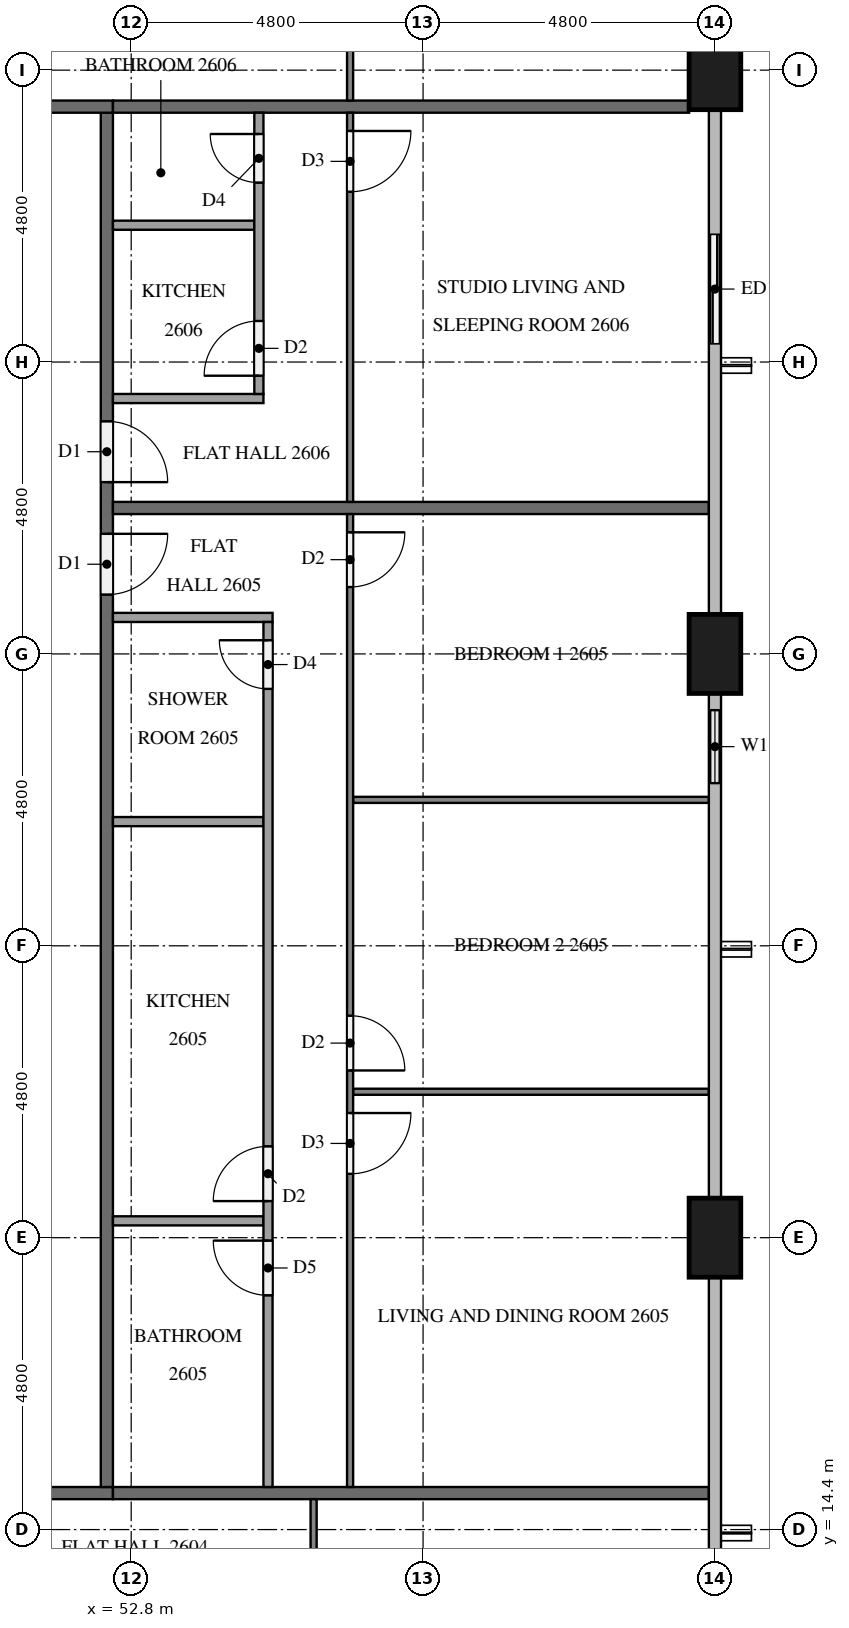
"""IFC4 building model, lengths in metres.
Left out: names, types, materials, properties, quantities, classifications, styles, units other than length and angle.
Written with IfcOpenShell. Run it as: python <this file> out.ifc"""

import sys

from ifc_helpers import new_model, si_unit, direction, frame, frame_2d, origin, origin_2d, place, context, subcontext, project, spatial, rectangle, extrude, element, fill, save


model = new_model("IFC4")
c1 = context("Model", 3, precision=1e-05, world=origin(), true_north=direction((0.0, 1.0)))
c2 = subcontext(c1, "Body", "Model", "MODEL_VIEW")
j1 = project(units=[si_unit("LENGTHUNIT", "METRE"), si_unit("PLANEANGLEUNIT", "RADIAN")], contexts=[c1])
p1 = place(None, origin())
s1 = spatial("IfcSite", under=j1, at=p1, CompositionType="ELEMENT")
p2 = place(p1, origin())
s2 = spatial("IfcBuilding", under=s1, at=p2, CompositionType="ELEMENT")
p3 = place(p2, frame((0.0, 0.0, 103.2)))
s3 = spatial("IfcBuildingStorey", under=s2, at=p3, CompositionType="ELEMENT", Elevation=103.2)
for number, where, z_axis, x_axis in (
    (1, (62.4, 19.2, 0.0), (0.0, 0.0, 1.0), (0.0, 1.0, 0.0)),
    (2, (62.4, 28.8, 0.0), (0.0, 0.0, 1.0), (0.0, 1.0, 0.0)),
    (3, (62.4, 38.4, 0.0), (0.0, 0.0, 1.0), (0.0, 1.0, 0.0)),
):
    element("IfcColumn", number, at=place(p3, frame(where, z_axis=z_axis, x_axis=x_axis)), inside=s3, PredefinedType="COLUMN", context=c2, shape_type="SweptSolid", body=[
        extrude(rectangle(XDim=1.3, YDim=0.85, at=origin_2d()), origin(), (0.0, 0.0, 1.0), 3.2),
    ])
p4 = place(p3, frame((62.4, 26.4, 0.0), z_axis=(0.0, 0.0, 1.0), x_axis=(0.0, 1.0, 0.0)))
e4 = element("IfcWall", 4, at=p4, inside=s3, PredefinedType="SOLIDWALL", context=c2, shape_type="SweptSolid", body=[
    extrude(rectangle(XDim=1.75, YDim=0.15, at=frame_2d((0.875, 0.0))), origin(), (0.0, 0.0, 1.0), 3.2),
])
p5 = place(p4, frame((0.275, 0.0, 0.9)))
e5 = element("IfcOpeningElement", 5, at=p5, cuts=e4, PredefinedType="OPENING", context=c2, shape_type="SweptSolid", body=[
    extrude(rectangle(XDim=1.2, YDim=1.4, at=frame_2d((0.6, 0.7))), frame((0.0, 0.085, 0.0), z_axis=(0.0, -1.0, 0.0), x_axis=(1.0, 0.0, 0.0)), (0.0, 0.0, 1.0), 0.17),
])
p6 = place(p3, frame((62.4, 33.6, 0.0), z_axis=(0.0, 0.0, 1.0), x_axis=(0.0, 1.0, 0.0)))
e6 = element("IfcWall", 6, at=p6, inside=s3, PredefinedType="SOLIDWALL", context=c2, shape_type="SweptSolid", body=[
    extrude(rectangle(XDim=2.4, YDim=0.15, at=frame_2d((1.2, 0.0))), origin(), (0.0, 0.0, 1.0), 3.2),
])
p7 = place(p6, frame((0.3, 0.0, 0.0)))
e7 = element("IfcOpeningElement", 7, at=p7, cuts=e6, PredefinedType="OPENING", context=c2, shape_type="SweptSolid", body=[
    extrude(rectangle(XDim=1.8, YDim=2.4, at=frame_2d((0.9, 1.2))), frame((0.0, 0.085, 0.0), z_axis=(0.0, -1.0, 0.0), x_axis=(1.0, 0.0, 0.0)), (0.0, 0.0, 1.0), 0.17),
])
p8 = place(p3, frame((50.3, 15.0, 0.0), z_axis=(0.0, 0.0, 1.0), x_axis=(1.0, 0.0, 0.0)))
e8 = element("IfcWall", 8, at=p8, inside=s3, PredefinedType="PARTITIONING", context=c2, shape_type="SweptSolid", body=[
    extrude(rectangle(XDim=2.2, YDim=0.2, at=frame_2d((1.1, 0.0))), origin(), (0.0, 0.0, 1.0), 3.2),
])
p9 = place(p3, frame((52.4, 37.7, 0.0), z_axis=(0.0, 0.0, 1.0), x_axis=(0.0, -1.0, 0.0)))
e9 = element("IfcWall", 9, at=p9, inside=s3, PredefinedType="PARTITIONING", context=c2, shape_type="SweptSolid", body=[
    extrude(rectangle(XDim=22.6, YDim=0.2, at=frame_2d((11.3, 0.0))), origin(), (0.0, 0.0, 1.0), 3.2),
])
p10 = place(p9, frame((6.925, 0.0, 0.0)))
e10 = element("IfcOpeningElement", 10, at=p10, cuts=e9, PredefinedType="OPENING", context=c2, shape_type="SweptSolid", body=[
    extrude(rectangle(XDim=1.0, YDim=2.1, at=frame_2d((0.5, 1.05))), frame((0.0, 0.11, 0.0), z_axis=(0.0, -1.0, 0.0), x_axis=(1.0, 0.0, 0.0)), (0.0, 0.0, 1.0), 0.22),
])
p11 = place(p9, frame((5.075, 0.0, 0.0)))
e11 = element("IfcOpeningElement", 11, at=p11, cuts=e9, PredefinedType="OPENING", context=c2, shape_type="SweptSolid", body=[
    extrude(rectangle(XDim=1.0, YDim=2.1, at=frame_2d((0.5, 1.05))), frame((0.0, 0.11, 0.0), z_axis=(0.0, -1.0, 0.0), x_axis=(1.0, 0.0, 0.0)), (0.0, 0.0, 1.0), 0.22),
])
p12 = place(p3, frame((52.5, 37.8, 0.0), z_axis=(0.0, 0.0, 1.0), x_axis=(-1.0, 0.0, 0.0)))
e12 = element("IfcWall", 12, at=p12, inside=s3, PredefinedType="PARTITIONING", context=c2, shape_type="SweptSolid", body=[
    extrude(rectangle(XDim=2.2, YDim=0.2, at=frame_2d((1.1, 0.0))), origin(), (0.0, 0.0, 1.0), 3.2),
])
for number, where, z_axis, x_axis in (
    (13, (52.5, 15.0, 0.0), (0.0, 0.0, 1.0), (1.0, 0.0, 0.0)),
    (14, (52.5, 31.2, 0.0), (0.0, 0.0, 1.0), (1.0, 0.0, 0.0)),
):
    element("IfcWall", number, at=place(p3, frame(where, z_axis=z_axis, x_axis=x_axis)), inside=s3, PredefinedType="PARTITIONING", context=c2, shape_type="SweptSolid", body=[
        extrude(rectangle(XDim=9.8, YDim=0.2, at=frame_2d((4.9, 0.0))), origin(), (0.0, 0.0, 1.0), 3.2),
    ])
p13 = place(p3, frame((52.5, 37.8, 0.0), z_axis=(0.0, 0.0, 1.0), x_axis=(1.0, 0.0, 0.0)))
e15 = element("IfcWall", 15, at=p13, inside=s3, PredefinedType="PARTITIONING", context=c2, shape_type="SweptSolid", body=[
    extrude(rectangle(XDim=9.475, YDim=0.2, at=frame_2d((4.738, 0.0))), origin(), (0.0, 0.0, 1.0), 3.2),
])
p14 = place(p3, frame((55.8, 14.9, 0.0), z_axis=(0.0, 0.0, 1.0), x_axis=(0.0, -1.0, 0.0)))
e16 = element("IfcWall", 16, at=p14, inside=s3, PredefinedType="PARTITIONING", context=c2, shape_type="SweptSolid", body=[
    extrude(rectangle(XDim=10.0, YDim=0.1, at=frame_2d((5.0, 0.0))), origin(), (0.0, 0.0, 1.0), 3.2),
])
p15 = place(p14, frame((4.05, 0.0, 0.0)))
e17 = element("IfcOpeningElement", 17, at=p15, cuts=e16, PredefinedType="OPENING", context=c2, shape_type="SweptSolid", body=[
    extrude(rectangle(XDim=0.9, YDim=2.1, at=frame_2d((0.45, 1.05))), frame((0.0, 0.06, 0.0), z_axis=(0.0, -1.0, 0.0), x_axis=(1.0, 0.0, 0.0)), (0.0, 0.0, 1.0), 0.12),
])
p16 = place(p14, frame((5.65, 0.0, 0.0)))
e18 = element("IfcOpeningElement", 18, at=p16, cuts=e16, PredefinedType="OPENING", context=c2, shape_type="SweptSolid", body=[
    extrude(rectangle(XDim=1.0, YDim=2.1, at=frame_2d((0.5, 1.05))), frame((0.0, 0.06, 0.0), z_axis=(0.0, -1.0, 0.0), x_axis=(1.0, 0.0, 0.0)), (0.0, 0.0, 1.0), 0.12),
])
for number, where, z_axis, x_axis in (
    (19, (56.45, 26.4, 0.0), (0.0, 0.0, 1.0), (1.0, 0.0, 0.0)),
    (20, (56.45, 21.6, 0.0), (0.0, 0.0, 1.0), (1.0, 0.0, 0.0)),
):
    element("IfcWall", number, at=place(p3, frame(where, z_axis=z_axis, x_axis=x_axis)), inside=s3, PredefinedType="PARTITIONING", context=c2, shape_type="SweptSolid", body=[
        extrude(rectangle(XDim=5.85, YDim=0.1, at=frame_2d((2.925, 0.0))), origin(), (0.0, 0.0, 1.0), 3.2),
    ])
p17 = place(p3, frame((56.4, 31.1, 0.0), z_axis=(0.0, 0.0, 1.0), x_axis=(0.0, -1.0, 0.0)))
e21 = element("IfcWall", 21, at=p17, inside=s3, PredefinedType="PARTITIONING", context=c2, shape_type="SweptSolid", body=[
    extrude(rectangle(XDim=16.0, YDim=0.1, at=frame_2d((8.0, 0.0))), origin(), (0.0, 0.0, 1.0), 3.2),
])
p18 = place(p17, frame((0.3, 0.0, 0.0)))
e22 = element("IfcOpeningElement", 22, at=p18, cuts=e21, PredefinedType="OPENING", context=c2, shape_type="SweptSolid", body=[
    extrude(rectangle(XDim=0.9, YDim=2.1, at=frame_2d((0.45, 1.05))), frame((0.0, 0.06, 0.0), z_axis=(0.0, -1.0, 0.0), x_axis=(1.0, 0.0, 0.0)), (0.0, 0.0, 1.0), 0.12),
])
p19 = place(p17, frame((8.25, 0.0, 0.0)))
e23 = element("IfcOpeningElement", 23, at=p19, cuts=e21, PredefinedType="OPENING", context=c2, shape_type="SweptSolid", body=[
    extrude(rectangle(XDim=0.9, YDim=2.1, at=frame_2d((0.45, 1.05))), frame((0.0, 0.06, 0.0), z_axis=(0.0, -1.0, 0.0), x_axis=(1.0, 0.0, 0.0)), (0.0, 0.0, 1.0), 0.12),
])
p20 = place(p17, frame((9.85, 0.0, 0.0)))
e24 = element("IfcOpeningElement", 24, at=p20, cuts=e21, PredefinedType="OPENING", context=c2, shape_type="SweptSolid", body=[
    extrude(rectangle(XDim=1.0, YDim=2.1, at=frame_2d((0.5, 1.05))), frame((0.0, 0.06, 0.0), z_axis=(0.0, -1.0, 0.0), x_axis=(1.0, 0.0, 0.0)), (0.0, 0.0, 1.0), 0.12),
])
for number, where, z_axis, x_axis in (
    (25, (52.5, 26.042, 0.0), (0.0, 0.0, 1.0), (1.0, 0.0, 0.0)),
    (26, (52.5, 19.477, 0.0), (0.0, 0.0, 1.0), (1.0, 0.0, 0.0)),
):
    element("IfcWall", number, at=place(p3, frame(where, z_axis=z_axis, x_axis=x_axis)), inside=s3, PredefinedType="PARTITIONING", context=c2, shape_type="SweptSolid", body=[
        extrude(rectangle(XDim=2.475, YDim=0.15, at=frame_2d((1.238, 0.0))), origin(), (0.0, 0.0, 1.0), 3.2),
    ])
p21 = place(p3, frame((52.5, 29.4, 0.0), z_axis=(0.0, 0.0, 1.0), x_axis=(1.0, 0.0, 0.0)))
e27 = element("IfcWall", 27, at=p21, inside=s3, PredefinedType="PARTITIONING", context=c2, shape_type="SweptSolid", body=[
    extrude(rectangle(XDim=2.625, YDim=0.15, at=frame_2d((1.312, 0.0))), origin(), (0.0, 0.0, 1.0), 3.2),
])
p22 = place(p3, frame((55.05, 15.1, 0.0), z_axis=(0.0, 0.0, 1.0), x_axis=(0.0, 1.0, 0.0)))
e28 = element("IfcWall", 28, at=p22, inside=s3, PredefinedType="PARTITIONING", context=c2, shape_type="SweptSolid", body=[
    extrude(rectangle(XDim=14.225, YDim=0.15, at=frame_2d((7.112, 0.0))), origin(), (0.0, 0.0, 1.0), 3.2),
])
p23 = place(p22, frame((13.125, 0.0, 0.0)))
e29 = element("IfcOpeningElement", 29, at=p23, cuts=e28, PredefinedType="OPENING", context=c2, shape_type="SweptSolid", body=[
    extrude(rectangle(XDim=0.8, YDim=2.1, at=frame_2d((0.4, 1.05))), frame((0.0, 0.085, 0.0), z_axis=(0.0, -1.0, 0.0), x_axis=(1.0, 0.0, 0.0)), (0.0, 0.0, 1.0), 0.17),
])
p24 = place(p22, frame((4.702, 0.0, 0.0)))
e30 = element("IfcOpeningElement", 30, at=p24, cuts=e28, PredefinedType="OPENING", context=c2, shape_type="SweptSolid", body=[
    extrude(rectangle(XDim=0.9, YDim=2.1, at=frame_2d((0.45, 1.05))), frame((0.0, 0.085, 0.0), z_axis=(0.0, -1.0, 0.0), x_axis=(1.0, 0.0, 0.0)), (0.0, 0.0, 1.0), 0.17),
])
p25 = place(p22, frame((3.152, 0.0, 0.0)))
e31 = element("IfcOpeningElement", 31, at=p25, cuts=e28, PredefinedType="OPENING", context=c2, shape_type="SweptSolid", body=[
    extrude(rectangle(XDim=0.9, YDim=2.1, at=frame_2d((0.45, 1.05))), frame((0.0, 0.085, 0.0), z_axis=(0.0, -1.0, 0.0), x_axis=(1.0, 0.0, 0.0)), (0.0, 0.0, 1.0), 0.17),
])
p26 = place(p3, frame((56.4, 37.7, 0.0), z_axis=(0.0, 0.0, 1.0), x_axis=(0.0, -1.0, 0.0)))
e32 = element("IfcWall", 32, at=p26, inside=s3, PredefinedType="PARTITIONING", context=c2, shape_type="SweptSolid", body=[
    extrude(rectangle(XDim=6.4, YDim=0.1, at=frame_2d((3.2, 0.0))), origin(), (0.0, 0.0, 1.0), 3.2),
])
p27 = place(p26, frame((0.3, 0.0, 0.0)))
e33 = element("IfcOpeningElement", 33, at=p27, cuts=e32, PredefinedType="OPENING", context=c2, shape_type="SweptSolid", body=[
    extrude(rectangle(XDim=1.0, YDim=2.1, at=frame_2d((0.5, 1.05))), frame((0.0, 0.06, 0.0), z_axis=(0.0, -1.0, 0.0), x_axis=(1.0, 0.0, 0.0)), (0.0, 0.0, 1.0), 0.12),
])
p28 = place(p3, frame((52.5, 35.85, 0.0), z_axis=(0.0, 0.0, 1.0), x_axis=(1.0, 0.0, 0.0)))
e34 = element("IfcWall", 34, at=p28, inside=s3, PredefinedType="PARTITIONING", context=c2, shape_type="SweptSolid", body=[
    extrude(rectangle(XDim=2.325, YDim=0.15, at=frame_2d((1.163, 0.0))), origin(), (0.0, 0.0, 1.0), 3.2),
])
p29 = place(p3, frame((52.5, 33.0, 0.0), z_axis=(0.0, 0.0, 1.0), x_axis=(1.0, 0.0, 0.0)))
e35 = element("IfcWall", 35, at=p29, inside=s3, PredefinedType="PARTITIONING", context=c2, shape_type="SweptSolid", body=[
    extrude(rectangle(XDim=2.475, YDim=0.15, at=frame_2d((1.238, 0.0))), origin(), (0.0, 0.0, 1.0), 3.2),
])
p30 = place(p3, frame((54.9, 33.075, 0.0), z_axis=(0.0, 0.0, 1.0), x_axis=(0.0, 1.0, 0.0)))
e36 = element("IfcWall", 36, at=p30, inside=s3, PredefinedType="PARTITIONING", context=c2, shape_type="SweptSolid", body=[
    extrude(rectangle(XDim=4.625, YDim=0.15, at=frame_2d((2.312, 0.0))), origin(), (0.0, 0.0, 1.0), 3.2),
])
p31 = place(p30, frame((0.3, 0.0, 0.0)))
e37 = element("IfcOpeningElement", 37, at=p31, cuts=e36, PredefinedType="OPENING", context=c2, shape_type="SweptSolid", body=[
    extrude(rectangle(XDim=0.9, YDim=2.1, at=frame_2d((0.45, 1.05))), frame((0.0, 0.085, 0.0), z_axis=(0.0, -1.0, 0.0), x_axis=(1.0, 0.0, 0.0)), (0.0, 0.0, 1.0), 0.17),
])
p32 = place(p30, frame((3.475, 0.0, 0.0)))
e38 = element("IfcOpeningElement", 38, at=p32, cuts=e36, PredefinedType="OPENING", context=c2, shape_type="SweptSolid", body=[
    extrude(rectangle(XDim=0.8, YDim=2.1, at=frame_2d((0.4, 1.05))), frame((0.0, 0.085, 0.0), z_axis=(0.0, -1.0, 0.0), x_axis=(1.0, 0.0, 0.0)), (0.0, 0.0, 1.0), 0.17),
])
p33 = place(p3, frame((56.4, 52.7, 0.0), z_axis=(0.0, 0.0, 1.0), x_axis=(0.0, -1.0, 0.0)))
e39 = element("IfcWall", 39, at=p33, inside=s3, PredefinedType="PARTITIONING", context=c2, shape_type="SweptSolid", body=[
    extrude(rectangle(XDim=14.8, YDim=0.1, at=frame_2d((7.4, 0.0))), origin(), (0.0, 0.0, 1.0), 3.2),
])
p34 = place(p33, frame((9.85, 0.0, 0.0)))
e40 = element("IfcOpeningElement", 40, at=p34, cuts=e39, PredefinedType="OPENING", context=c2, shape_type="SweptSolid", body=[
    extrude(rectangle(XDim=0.9, YDim=2.1, at=frame_2d((0.45, 1.05))), frame((0.0, 0.06, 0.0), z_axis=(0.0, -1.0, 0.0), x_axis=(1.0, 0.0, 0.0)), (0.0, 0.0, 1.0), 0.12),
])
p35 = place(p33, frame((8.15, 0.0, 0.0)))
e41 = element("IfcOpeningElement", 41, at=p35, cuts=e39, PredefinedType="OPENING", context=c2, shape_type="SweptSolid", body=[
    extrude(rectangle(XDim=1.0, YDim=2.1, at=frame_2d((0.5, 1.05))), frame((0.0, 0.06, 0.0), z_axis=(0.0, -1.0, 0.0), x_axis=(1.0, 0.0, 0.0)), (0.0, 0.0, 1.0), 0.12),
])
p36 = place(p33, frame((0.5, 0.0, 0.0)))
e42 = element("IfcOpeningElement", 42, at=p36, cuts=e39, PredefinedType="OPENING", context=c2, shape_type="SweptSolid", body=[
    extrude(rectangle(XDim=0.9, YDim=2.1, at=frame_2d((0.45, 1.05))), frame((0.0, 0.06, 0.0), z_axis=(0.0, -1.0, 0.0), x_axis=(1.0, 0.0, 0.0)), (0.0, 0.0, 1.0), 0.12),
])
p37 = place(p5, origin())
e43 = element("IfcWindow", 43, at=p37, inside=s3, PartitioningType="SINGLE_PANEL", PredefinedType="WINDOW", context=c2, shape_type="SweptSolid", body=[
    extrude(rectangle(XDim=1.2, YDim=1.4, at=frame_2d((0.6, 0.7))), frame((0.0, 0.03, 0.0), z_axis=(0.0, -1.0, 0.0), x_axis=(1.0, 0.0, 0.0)), (0.0, 0.0, 1.0), 0.06),
])
fill(e5, e43)
p38 = place(p7, origin())
e44 = element("IfcDoor", 44, at=p38, inside=s3, OperationType="SLIDING_TO_RIGHT", PredefinedType="DOOR", context=c2, shape_type="SweptSolid", body=[
    extrude(rectangle(XDim=1.8, YDim=2.4, at=frame_2d((0.9, 1.2))), frame((0.0, 0.025, 0.0), z_axis=(0.0, -1.0, 0.0), x_axis=(1.0, 0.0, 0.0)), (0.0, 0.0, 1.0), 0.05),
])
fill(e7, e44)
p39 = place(p10, origin())
e45 = element("IfcDoor", 45, at=p39, inside=s3, OperationType="SINGLE_SWING_LEFT", PredefinedType="DOOR", context=c2, shape_type="SweptSolid", body=[
    extrude(rectangle(XDim=1.0, YDim=2.1, at=frame_2d((0.5, 1.05))), frame((0.0, 0.025, 0.0), z_axis=(0.0, -1.0, 0.0), x_axis=(1.0, 0.0, 0.0)), (0.0, 0.0, 1.0), 0.05),
])
fill(e10, e45)
p40 = place(p11, origin())
e46 = element("IfcDoor", 46, at=p40, inside=s3, OperationType="SINGLE_SWING_RIGHT", PredefinedType="DOOR", context=c2, shape_type="SweptSolid", body=[
    extrude(rectangle(XDim=1.0, YDim=2.1, at=frame_2d((0.5, 1.05))), frame((0.0, 0.025, 0.0), z_axis=(0.0, -1.0, 0.0), x_axis=(1.0, 0.0, 0.0)), (0.0, 0.0, 1.0), 0.05),
])
fill(e11, e46)
p41 = place(p18, origin())
e47 = element("IfcDoor", 47, at=p41, inside=s3, OperationType="SINGLE_SWING_LEFT", PredefinedType="DOOR", context=c2, shape_type="SweptSolid", body=[
    extrude(rectangle(XDim=0.9, YDim=2.1, at=frame_2d((0.45, 1.05))), frame((0.0, 0.025, 0.0), z_axis=(0.0, -1.0, 0.0), x_axis=(1.0, 0.0, 0.0)), (0.0, 0.0, 1.0), 0.05),
])
fill(e22, e47)
p42 = place(p19, origin())
e48 = element("IfcDoor", 48, at=p42, inside=s3, OperationType="SINGLE_SWING_RIGHT", PredefinedType="DOOR", context=c2, shape_type="SweptSolid", body=[
    extrude(rectangle(XDim=0.9, YDim=2.1, at=frame_2d((0.45, 1.05))), frame((0.0, 0.025, 0.0), z_axis=(0.0, -1.0, 0.0), x_axis=(1.0, 0.0, 0.0)), (0.0, 0.0, 1.0), 0.05),
])
fill(e23, e48)
p43 = place(p20, origin())
e49 = element("IfcDoor", 49, at=p43, inside=s3, OperationType="SINGLE_SWING_LEFT", PredefinedType="DOOR", context=c2, shape_type="SweptSolid", body=[
    extrude(rectangle(XDim=1.0, YDim=2.1, at=frame_2d((0.5, 1.05))), frame((0.0, 0.025, 0.0), z_axis=(0.0, -1.0, 0.0), x_axis=(1.0, 0.0, 0.0)), (0.0, 0.0, 1.0), 0.05),
])
fill(e24, e49)
p44 = place(p23, origin())
e50 = element("IfcDoor", 50, at=p44, inside=s3, OperationType="SINGLE_SWING_RIGHT", PredefinedType="DOOR", context=c2, shape_type="SweptSolid", body=[
    extrude(rectangle(XDim=0.8, YDim=2.1, at=frame_2d((0.4, 1.05))), frame((0.0, 0.025, 0.0), z_axis=(0.0, -1.0, 0.0), x_axis=(1.0, 0.0, 0.0)), (0.0, 0.0, 1.0), 0.05),
])
fill(e29, e50)
p45 = place(p24, origin())
e51 = element("IfcDoor", 51, at=p45, inside=s3, OperationType="SINGLE_SWING_LEFT", PredefinedType="DOOR", context=c2, shape_type="SweptSolid", body=[
    extrude(rectangle(XDim=0.9, YDim=2.1, at=frame_2d((0.45, 1.05))), frame((0.0, 0.025, 0.0), z_axis=(0.0, -1.0, 0.0), x_axis=(1.0, 0.0, 0.0)), (0.0, 0.0, 1.0), 0.05),
])
fill(e30, e51)
p46 = place(p25, origin())
e52 = element("IfcDoor", 52, at=p46, inside=s3, OperationType="SINGLE_SWING_RIGHT", PredefinedType="DOOR", context=c2, shape_type="SweptSolid", body=[
    extrude(rectangle(XDim=0.9, YDim=2.1, at=frame_2d((0.45, 1.05))), frame((0.0, 0.025, 0.0), z_axis=(0.0, -1.0, 0.0), x_axis=(1.0, 0.0, 0.0)), (0.0, 0.0, 1.0), 0.05),
])
fill(e31, e52)
p47 = place(p27, origin())
e53 = element("IfcDoor", 53, at=p47, inside=s3, OperationType="SINGLE_SWING_LEFT", PredefinedType="DOOR", context=c2, shape_type="SweptSolid", body=[
    extrude(rectangle(XDim=1.0, YDim=2.1, at=frame_2d((0.5, 1.05))), frame((0.0, 0.025, 0.0), z_axis=(0.0, -1.0, 0.0), x_axis=(1.0, 0.0, 0.0)), (0.0, 0.0, 1.0), 0.05),
])
fill(e33, e53)
p48 = place(p31, origin())
e54 = element("IfcDoor", 54, at=p48, inside=s3, OperationType="SINGLE_SWING_LEFT", PredefinedType="DOOR", context=c2, shape_type="SweptSolid", body=[
    extrude(rectangle(XDim=0.9, YDim=2.1, at=frame_2d((0.45, 1.05))), frame((0.0, 0.025, 0.0), z_axis=(0.0, -1.0, 0.0), x_axis=(1.0, 0.0, 0.0)), (0.0, 0.0, 1.0), 0.05),
])
fill(e37, e54)
p49 = place(p32, origin())
e55 = element("IfcDoor", 55, at=p49, inside=s3, OperationType="SINGLE_SWING_RIGHT", PredefinedType="DOOR", context=c2, shape_type="SweptSolid", body=[
    extrude(rectangle(XDim=0.8, YDim=2.1, at=frame_2d((0.4, 1.05))), frame((0.0, 0.025, 0.0), z_axis=(0.0, -1.0, 0.0), x_axis=(1.0, 0.0, 0.0)), (0.0, 0.0, 1.0), 0.05),
])
fill(e38, e55)
save(model, sys.argv[1])
